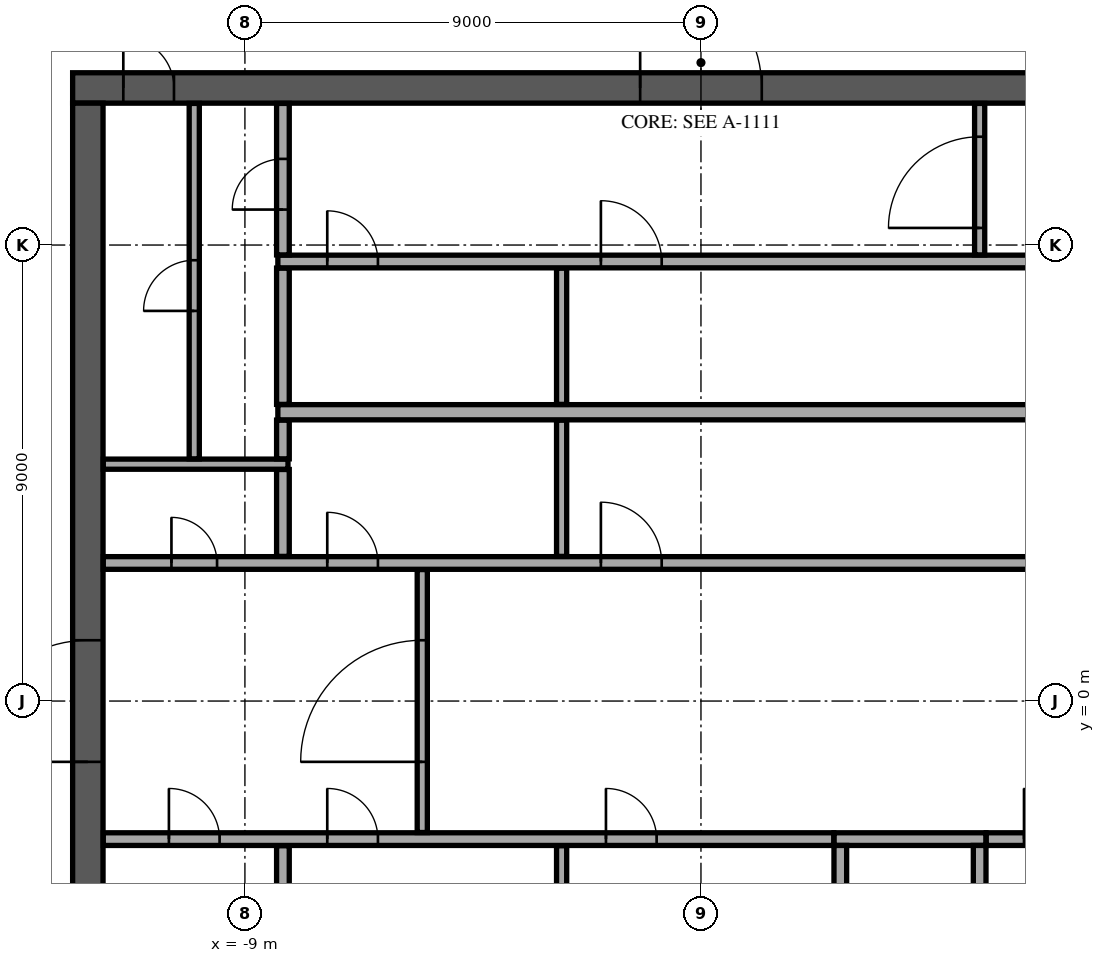
"""IFC4 building model, lengths in metres.
Left out: names, types, materials, properties, quantities, classifications, styles, units other than length and angle.
Written with IfcOpenShell. Run it as: python <this file> out.ifc"""

import sys

from ifc_helpers import new_model, si_unit, direction, frame, frame_2d, origin, place, context, subcontext, project, spatial, rectangle, extrude, element, fill, save


model = new_model("IFC4")
c1 = context("Model", 3, precision=1e-05, world=origin(), true_north=direction((0.0, 1.0)))
c2 = subcontext(c1, "Body", "Model", "MODEL_VIEW")
j1 = project(units=[si_unit("LENGTHUNIT", "METRE"), si_unit("PLANEANGLEUNIT", "RADIAN")], contexts=[c1])
p1 = place(None, origin())
s1 = spatial("IfcSite", under=j1, at=p1, CompositionType="ELEMENT")
p2 = place(p1, origin())
s2 = spatial("IfcBuilding", under=s1, at=p2, CompositionType="ELEMENT")
p3 = place(p2, frame((0.0, 0.0, 363.1)))
s3 = spatial("IfcBuildingStorey", under=s2, at=p3, CompositionType="ELEMENT", Elevation=363.1)
p4 = place(p3, frame((-12.4, 12.1, 0.0), z_axis=(0.0, 0.0, 1.0), x_axis=(1.0, 0.0, 0.0)))
e1 = element("IfcWall", 1, at=p4, inside=s3, PredefinedType="SHEAR", context=c2, shape_type="SweptSolid", body=[
    extrude(rectangle(XDim=24.8, YDim=0.6, at=frame_2d((12.4, 0.0))), origin(), (0.0, 0.0, 1.0), 4.7),
])
p5 = place(p4, frame((11.2, 0.0, 0.0)))
e2 = element("IfcOpeningElement", 2, at=p5, cuts=e1, PredefinedType="OPENING", context=c2, shape_type="SweptSolid", body=[
    extrude(rectangle(XDim=2.4, YDim=2.4, at=frame_2d((1.2, 1.2))), frame((0.0, 0.31, 0.0), z_axis=(0.0, -1.0, 0.0), x_axis=(1.0, 0.0, 0.0)), (0.0, 0.0, 1.0), 0.62),
])
p6 = place(p4, frame((22.025, 0.0, 0.0)))
e3 = element("IfcOpeningElement", 3, at=p6, cuts=e1, PredefinedType="OPENING", context=c2, shape_type="SweptSolid", body=[
    extrude(rectangle(XDim=1.2, YDim=2.1, at=frame_2d((0.6, 1.05))), frame((0.0, 0.31, 0.0), z_axis=(0.0, -1.0, 0.0), x_axis=(1.0, 0.0, 0.0)), (0.0, 0.0, 1.0), 0.62),
])
p7 = place(p4, frame((1.0, 0.0, 0.0)))
e4 = element("IfcOpeningElement", 4, at=p7, cuts=e1, PredefinedType="OPENING", context=c2, shape_type="SweptSolid", body=[
    extrude(rectangle(XDim=1.0, YDim=2.1, at=frame_2d((0.5, 1.05))), frame((0.0, 0.31, 0.0), z_axis=(0.0, -1.0, 0.0), x_axis=(1.0, 0.0, 0.0)), (0.0, 0.0, 1.0), 0.62),
])
p8 = place(p3, frame((-12.1, -11.8, 0.0), z_axis=(0.0, 0.0, 1.0), x_axis=(0.0, 1.0, 0.0)))
e5 = element("IfcWall", 5, at=p8, inside=s3, PredefinedType="SHEAR", context=c2, shape_type="SweptSolid", body=[
    extrude(rectangle(XDim=23.6, YDim=0.6, at=frame_2d((11.8, 0.0))), origin(), (0.0, 0.0, 1.0), 4.7),
])
p9 = place(p8, frame((10.6, 0.0, 0.0)))
e6 = element("IfcOpeningElement", 6, at=p9, cuts=e5, PredefinedType="OPENING", context=c2, shape_type="SweptSolid", body=[
    extrude(rectangle(XDim=2.4, YDim=2.4, at=frame_2d((1.2, 1.2))), frame((0.0, 0.31, 0.0), z_axis=(0.0, -1.0, 0.0), x_axis=(1.0, 0.0, 0.0)), (0.0, 0.0, 1.0), 0.62),
])
p10 = place(p3, frame((2.625, -2.725, 0.0), z_axis=(0.0, 0.0, 1.0), x_axis=(1.0, 0.0, 0.0)))
e7 = element("IfcWall", 7, at=p10, inside=s3, PredefinedType="SOLIDWALL", context=c2, shape_type="SweptSolid", body=[
    extrude(rectangle(XDim=3.0, YDim=0.25, at=frame_2d((1.5, 0.0))), origin(), (0.0, 0.0, 1.0), 4.7),
])
for number, where, z_axis, x_axis in (
    (8, (2.75, -5.55, 0.0), (0.0, 0.0, 1.0), (0.0, 1.0, 0.0)),
    (9, (5.5, -5.55, 0.0), (0.0, 0.0, 1.0), (0.0, 1.0, 0.0)),
):
    element("IfcWall", number, at=place(p3, frame(where, z_axis=z_axis, x_axis=x_axis)), inside=s3, PredefinedType="SOLIDWALL", context=c2, shape_type="SweptSolid", body=[
        extrude(rectangle(XDim=2.7, YDim=0.25, at=frame_2d((1.35, 0.0))), origin(), (0.0, 0.0, 1.0), 4.7),
    ])
p11 = place(p3, frame((-8.25, -5.545, 0.0), z_axis=(0.0, 0.0, 1.0), x_axis=(0.0, 1.0, 0.0)))
e10 = element("IfcWall", 10, at=p11, inside=s3, PredefinedType="PARTITIONING", context=c2, shape_type="SweptSolid", body=[
    extrude(rectangle(XDim=2.69, YDim=0.25, at=frame_2d((1.345, 0.0))), origin(), (0.0, 0.0, 1.0), 4.7),
])
p12 = place(p3, frame((-2.75, -5.545, 0.0), z_axis=(0.0, 0.0, 1.0), x_axis=(0.0, 1.0, 0.0)))
e11 = element("IfcWall", 11, at=p12, inside=s3, PredefinedType="PARTITIONING", context=c2, shape_type="SweptSolid", body=[
    extrude(rectangle(XDim=2.69, YDim=0.2, at=frame_2d((1.345, 0.0))), origin(), (0.0, 0.0, 1.0), 4.7),
])
p13 = place(p3, frame((-11.795, -2.725, 0.0), z_axis=(0.0, 0.0, 1.0), x_axis=(1.0, 0.0, 0.0)))
e12 = element("IfcWall", 12, at=p13, inside=s3, PredefinedType="PARTITIONING", context=c2, shape_type="SweptSolid", body=[
    extrude(rectangle(XDim=14.415, YDim=0.25, at=frame_2d((7.208, 0.0))), origin(), (0.0, 0.0, 1.0), 4.7),
])
p14 = place(p13, frame((1.295, 0.0, 0.0)))
e13 = element("IfcOpeningElement", 13, at=p14, cuts=e12, PredefinedType="OPENING", context=c2, shape_type="SweptSolid", body=[
    extrude(rectangle(XDim=1.0, YDim=2.1, at=frame_2d((0.5, 1.05))), frame((0.0, 0.135, 0.0), z_axis=(0.0, -1.0, 0.0), x_axis=(1.0, 0.0, 0.0)), (0.0, 0.0, 1.0), 0.27),
])
p15 = place(p13, frame((4.42, 0.0, 0.0)))
e14 = element("IfcOpeningElement", 14, at=p15, cuts=e12, PredefinedType="OPENING", context=c2, shape_type="SweptSolid", body=[
    extrude(rectangle(XDim=1.0, YDim=2.1, at=frame_2d((0.5, 1.05))), frame((0.0, 0.135, 0.0), z_axis=(0.0, -1.0, 0.0), x_axis=(1.0, 0.0, 0.0)), (0.0, 0.0, 1.0), 0.27),
])
p16 = place(p13, frame((9.92, 0.0, 0.0)))
e15 = element("IfcOpeningElement", 15, at=p16, cuts=e12, PredefinedType="OPENING", context=c2, shape_type="SweptSolid", body=[
    extrude(rectangle(XDim=1.0, YDim=2.1, at=frame_2d((0.5, 1.05))), frame((0.0, 0.135, 0.0), z_axis=(0.0, -1.0, 0.0), x_axis=(1.0, 0.0, 0.0)), (0.0, 0.0, 1.0), 0.27),
])
p17 = place(p3, frame((5.63, -2.725, 0.0), z_axis=(0.0, 0.0, 1.0), x_axis=(1.0, 0.0, 0.0)))
e16 = element("IfcWall", 16, at=p17, inside=s3, PredefinedType="PARTITIONING", context=c2, shape_type="SweptSolid", body=[
    extrude(rectangle(XDim=6.165, YDim=0.25, at=frame_2d((3.083, 0.0))), origin(), (0.0, 0.0, 1.0), 4.7),
])
p18 = place(p17, frame((0.745, 0.0, 0.0)))
e17 = element("IfcOpeningElement", 17, at=p18, cuts=e16, PredefinedType="OPENING", context=c2, shape_type="SweptSolid", body=[
    extrude(rectangle(XDim=1.0, YDim=2.1, at=frame_2d((0.5, 1.05))), frame((0.0, 0.135, 0.0), z_axis=(0.0, -1.0, 0.0), x_axis=(1.0, 0.0, 0.0)), (0.0, 0.0, 1.0), 0.27),
])
p19 = place(p17, frame((3.92, 0.0, 0.0)))
e18 = element("IfcOpeningElement", 18, at=p19, cuts=e16, PredefinedType="OPENING", context=c2, shape_type="SweptSolid", body=[
    extrude(rectangle(XDim=0.9, YDim=2.1, at=frame_2d((0.45, 1.05))), frame((0.0, 0.135, 0.0), z_axis=(0.0, -1.0, 0.0), x_axis=(1.0, 0.0, 0.0)), (0.0, 0.0, 1.0), 0.27),
])
p20 = place(p3, frame((-5.5, -2.595, 0.0), z_axis=(0.0, 0.0, 1.0), x_axis=(0.0, 1.0, 0.0)))
e19 = element("IfcWall", 19, at=p20, inside=s3, PredefinedType="PARTITIONING", context=c2, shape_type="SweptSolid", body=[
    extrude(rectangle(XDim=5.19, YDim=0.2, at=frame_2d((2.595, 0.0))), origin(), (0.0, 0.0, 1.0), 4.7),
])
p21 = place(p20, frame((1.395, 0.0, 0.0)))
e20 = element("IfcOpeningElement", 20, at=p21, cuts=e19, PredefinedType="OPENING", context=c2, shape_type="SweptSolid", body=[
    extrude(rectangle(XDim=2.4, YDim=2.4, at=frame_2d((1.2, 1.2))), frame((0.0, 0.11, 0.0), z_axis=(0.0, -1.0, 0.0), x_axis=(1.0, 0.0, 0.0)), (0.0, 0.0, 1.0), 0.22),
])
p22 = place(p3, frame((-11.795, 2.725, 0.0), z_axis=(0.0, 0.0, 1.0), x_axis=(1.0, 0.0, 0.0)))
e21 = element("IfcWall", 21, at=p22, inside=s3, PredefinedType="PARTITIONING", context=c2, shape_type="SweptSolid", body=[
    extrude(rectangle(XDim=23.59, YDim=0.25, at=frame_2d((11.795, 0.0))), origin(), (0.0, 0.0, 1.0), 4.7),
])
p23 = place(p22, frame((21.345, 0.0, 0.0)))
e22 = element("IfcOpeningElement", 22, at=p23, cuts=e21, PredefinedType="OPENING", context=c2, shape_type="SweptSolid", body=[
    extrude(rectangle(XDim=0.9, YDim=2.1, at=frame_2d((0.45, 1.05))), frame((0.0, 0.135, 0.0), z_axis=(0.0, -1.0, 0.0), x_axis=(1.0, 0.0, 0.0)), (0.0, 0.0, 1.0), 0.27),
])
p24 = place(p22, frame((1.345, 0.0, 0.0)))
e23 = element("IfcOpeningElement", 23, at=p24, cuts=e21, PredefinedType="OPENING", context=c2, shape_type="SweptSolid", body=[
    extrude(rectangle(XDim=0.9, YDim=2.1, at=frame_2d((0.45, 1.05))), frame((0.0, 0.135, 0.0), z_axis=(0.0, -1.0, 0.0), x_axis=(1.0, 0.0, 0.0)), (0.0, 0.0, 1.0), 0.27),
])
p25 = place(p22, frame((4.42, 0.0, 0.0)))
e24 = element("IfcOpeningElement", 24, at=p25, cuts=e21, PredefinedType="OPENING", context=c2, shape_type="SweptSolid", body=[
    extrude(rectangle(XDim=1.0, YDim=2.1, at=frame_2d((0.5, 1.05))), frame((0.0, 0.135, 0.0), z_axis=(0.0, -1.0, 0.0), x_axis=(1.0, 0.0, 0.0)), (0.0, 0.0, 1.0), 0.27),
])
p26 = place(p22, frame((9.82, 0.0, 0.0)))
e25 = element("IfcOpeningElement", 25, at=p26, cuts=e21, PredefinedType="OPENING", context=c2, shape_type="SweptSolid", body=[
    extrude(rectangle(XDim=1.2, YDim=2.1, at=frame_2d((0.6, 1.05))), frame((0.0, 0.135, 0.0), z_axis=(0.0, -1.0, 0.0), x_axis=(1.0, 0.0, 0.0)), (0.0, 0.0, 1.0), 0.27),
])
p27 = place(p3, frame((-8.25, 2.855, 0.0), z_axis=(0.0, 0.0, 1.0), x_axis=(0.0, 1.0, 0.0)))
e26 = element("IfcWall", 26, at=p27, inside=s3, PredefinedType="PARTITIONING", context=c2, shape_type="SweptSolid", body=[
    extrude(rectangle(XDim=1.715, YDim=0.25, at=frame_2d((0.857, 0.0))), origin(), (0.0, 0.0, 1.0), 4.7),
])
p28 = place(p3, frame((-2.75, 2.855, 0.0), z_axis=(0.0, 0.0, 1.0), x_axis=(0.0, 1.0, 0.0)))
e27 = element("IfcWall", 27, at=p28, inside=s3, PredefinedType="PARTITIONING", context=c2, shape_type="SweptSolid", body=[
    extrude(rectangle(XDim=2.69, YDim=0.2, at=frame_2d((1.345, 0.0))), origin(), (0.0, 0.0, 1.0), 4.7),
])
p29 = place(p3, frame((-11.795, 4.675, 0.0), z_axis=(0.0, 0.0, 1.0), x_axis=(1.0, 0.0, 0.0)))
e28 = element("IfcWall", 28, at=p29, inside=s3, PredefinedType="PARTITIONING", context=c2, shape_type="SweptSolid", body=[
    extrude(rectangle(XDim=3.645, YDim=0.2, at=frame_2d((1.823, 0.0))), origin(), (0.0, 0.0, 1.0), 4.7),
])
p30 = place(p3, frame((-10.0, 4.78, 0.0), z_axis=(0.0, 0.0, 1.0), x_axis=(0.0, 1.0, 0.0)))
e29 = element("IfcWall", 29, at=p30, inside=s3, PredefinedType="PARTITIONING", context=c2, shape_type="SweptSolid", body=[
    extrude(rectangle(XDim=7.015, YDim=0.2, at=frame_2d((3.507, 0.0))), origin(), (0.0, 0.0, 1.0), 4.7),
])
p31 = place(p30, frame((2.92, 0.0, 0.0)))
e30 = element("IfcOpeningElement", 30, at=p31, cuts=e29, PredefinedType="OPENING", context=c2, shape_type="SweptSolid", body=[
    extrude(rectangle(XDim=1.0, YDim=2.1, at=frame_2d((0.5, 1.05))), frame((0.0, 0.11, 0.0), z_axis=(0.0, -1.0, 0.0), x_axis=(1.0, 0.0, 0.0)), (0.0, 0.0, 1.0), 0.22),
])
p32 = place(p3, frame((-8.25, 4.78, 0.0), z_axis=(0.0, 0.0, 1.0), x_axis=(0.0, 1.0, 0.0)))
e31 = element("IfcWall", 31, at=p32, inside=s3, PredefinedType="PARTITIONING", context=c2, shape_type="SweptSolid", body=[
    extrude(rectangle(XDim=0.765, YDim=0.25, at=frame_2d((0.382, 0.0))), origin(), (0.0, 0.0, 1.0), 4.7),
])
p33 = place(p3, frame((-8.35, 5.7, 0.0), z_axis=(0.0, 0.0, 1.0), x_axis=(1.0, 0.0, 0.0)))
e32 = element("IfcWall", 32, at=p33, inside=s3, PredefinedType="PARTITIONING", context=c2, shape_type="SweptSolid", body=[
    extrude(rectangle(XDim=16.7, YDim=0.3, at=frame_2d((8.35, 0.0))), origin(), (0.0, 0.0, 1.0), 4.7),
])
p34 = place(p3, frame((-8.25, 5.855, 0.0), z_axis=(0.0, 0.0, 1.0), x_axis=(0.0, 1.0, 0.0)))
e33 = element("IfcWall", 33, at=p34, inside=s3, PredefinedType="PARTITIONING", context=c2, shape_type="SweptSolid", body=[
    extrude(rectangle(XDim=2.69, YDim=0.25, at=frame_2d((1.345, 0.0))), origin(), (0.0, 0.0, 1.0), 4.7),
])
p35 = place(p3, frame((-2.75, 5.855, 0.0), z_axis=(0.0, 0.0, 1.0), x_axis=(0.0, 1.0, 0.0)))
e34 = element("IfcWall", 34, at=p35, inside=s3, PredefinedType="PARTITIONING", context=c2, shape_type="SweptSolid", body=[
    extrude(rectangle(XDim=2.69, YDim=0.2, at=frame_2d((1.345, 0.0))), origin(), (0.0, 0.0, 1.0), 4.7),
])
p36 = place(p3, frame((-8.35, 8.675, 0.0), z_axis=(0.0, 0.0, 1.0), x_axis=(1.0, 0.0, 0.0)))
e35 = element("IfcWall", 35, at=p36, inside=s3, PredefinedType="PARTITIONING", context=c2, shape_type="SweptSolid", body=[
    extrude(rectangle(XDim=16.72, YDim=0.25, at=frame_2d((8.36, 0.0))), origin(), (0.0, 0.0, 1.0), 4.7),
])
p37 = place(p36, frame((0.975, 0.0, 0.0)))
e36 = element("IfcOpeningElement", 36, at=p37, cuts=e35, PredefinedType="OPENING", context=c2, shape_type="SweptSolid", body=[
    extrude(rectangle(XDim=1.0, YDim=2.1, at=frame_2d((0.5, 1.05))), frame((0.0, 0.135, 0.0), z_axis=(0.0, -1.0, 0.0), x_axis=(1.0, 0.0, 0.0)), (0.0, 0.0, 1.0), 0.27),
])
p38 = place(p36, frame((6.375, 0.0, 0.0)))
e37 = element("IfcOpeningElement", 37, at=p38, cuts=e35, PredefinedType="OPENING", context=c2, shape_type="SweptSolid", body=[
    extrude(rectangle(XDim=1.2, YDim=2.1, at=frame_2d((0.6, 1.05))), frame((0.0, 0.135, 0.0), z_axis=(0.0, -1.0, 0.0), x_axis=(1.0, 0.0, 0.0)), (0.0, 0.0, 1.0), 0.27),
])
p39 = place(p3, frame((-8.25, 8.805, 0.0), z_axis=(0.0, 0.0, 1.0), x_axis=(0.0, 1.0, 0.0)))
e38 = element("IfcWall", 38, at=p39, inside=s3, PredefinedType="PARTITIONING", context=c2, shape_type="SweptSolid", body=[
    extrude(rectangle(XDim=2.99, YDim=0.25, at=frame_2d((1.495, 0.0))), origin(), (0.0, 0.0, 1.0), 4.7),
])
p40 = place(p39, frame((0.895, 0.0, 0.0)))
e39 = element("IfcOpeningElement", 39, at=p40, cuts=e38, PredefinedType="OPENING", context=c2, shape_type="SweptSolid", body=[
    extrude(rectangle(XDim=1.0, YDim=2.1, at=frame_2d((0.5, 1.05))), frame((0.0, 0.135, 0.0), z_axis=(0.0, -1.0, 0.0), x_axis=(1.0, 0.0, 0.0)), (0.0, 0.0, 1.0), 0.27),
])
p41 = place(p3, frame((5.5, 8.805, 0.0), z_axis=(0.0, 0.0, 1.0), x_axis=(0.0, 1.0, 0.0)))
e40 = element("IfcWall", 40, at=p41, inside=s3, PredefinedType="PARTITIONING", context=c2, shape_type="SweptSolid", body=[
    extrude(rectangle(XDim=2.99, YDim=0.2, at=frame_2d((1.495, 0.0))), origin(), (0.0, 0.0, 1.0), 4.7),
])
p42 = place(p41, frame((0.532, 0.0, 0.0)))
e41 = element("IfcOpeningElement", 41, at=p42, cuts=e40, PredefinedType="OPENING", context=c2, shape_type="SweptSolid", body=[
    extrude(rectangle(XDim=1.8, YDim=2.1, at=frame_2d((0.9, 1.05))), frame((0.0, 0.11, 0.0), z_axis=(0.0, -1.0, 0.0), x_axis=(1.0, 0.0, 0.0)), (0.0, 0.0, 1.0), 0.22),
])
p43 = place(p5, origin())
e42 = element("IfcDoor", 42, at=p43, inside=s3, OperationType="SINGLE_SWING_LEFT", PredefinedType="DOOR", context=c2, shape_type="SweptSolid", body=[
    extrude(rectangle(XDim=2.4, YDim=2.4, at=frame_2d((1.2, 1.2))), frame((0.0, 0.025, 0.0), z_axis=(0.0, -1.0, 0.0), x_axis=(1.0, 0.0, 0.0)), (0.0, 0.0, 1.0), 0.05),
])
fill(e2, e42)
p44 = place(p7, origin())
e43 = element("IfcDoor", 43, at=p44, inside=s3, OperationType="SINGLE_SWING_LEFT", PredefinedType="DOOR", context=c2, shape_type="SweptSolid", body=[
    extrude(rectangle(XDim=1.0, YDim=2.1, at=frame_2d((0.5, 1.05))), frame((0.0, 0.025, 0.0), z_axis=(0.0, -1.0, 0.0), x_axis=(1.0, 0.0, 0.0)), (0.0, 0.0, 1.0), 0.05),
])
fill(e4, e43)
p45 = place(p9, origin())
e44 = element("IfcDoor", 44, at=p45, inside=s3, OperationType="SINGLE_SWING_LEFT", PredefinedType="DOOR", context=c2, shape_type="SweptSolid", body=[
    extrude(rectangle(XDim=2.4, YDim=2.4, at=frame_2d((1.2, 1.2))), frame((0.0, 0.025, 0.0), z_axis=(0.0, -1.0, 0.0), x_axis=(1.0, 0.0, 0.0)), (0.0, 0.0, 1.0), 0.05),
])
fill(e6, e44)
p46 = place(p14, origin())
e45 = element("IfcDoor", 45, at=p46, inside=s3, OperationType="SINGLE_SWING_RIGHT", PredefinedType="DOOR", context=c2, shape_type="SweptSolid", body=[
    extrude(rectangle(XDim=1.0, YDim=2.1, at=frame_2d((0.5, 1.05))), frame((0.0, 0.025, 0.0), z_axis=(0.0, -1.0, 0.0), x_axis=(1.0, 0.0, 0.0)), (0.0, 0.0, 1.0), 0.05),
])
fill(e13, e45)
p47 = place(p18, origin())
e46 = element("IfcDoor", 46, at=p47, inside=s3, OperationType="SINGLE_SWING_RIGHT", PredefinedType="DOOR", context=c2, shape_type="SweptSolid", body=[
    extrude(rectangle(XDim=1.0, YDim=2.1, at=frame_2d((0.5, 1.05))), frame((0.0, 0.025, 0.0), z_axis=(0.0, -1.0, 0.0), x_axis=(1.0, 0.0, 0.0)), (0.0, 0.0, 1.0), 0.05),
])
fill(e17, e46)
p48 = place(p24, origin())
e47 = element("IfcDoor", 47, at=p48, inside=s3, OperationType="SINGLE_SWING_RIGHT", PredefinedType="DOOR", context=c2, shape_type="SweptSolid", body=[
    extrude(rectangle(XDim=0.9, YDim=2.1, at=frame_2d((0.45, 1.05))), frame((0.0, 0.025, 0.0), z_axis=(0.0, -1.0, 0.0), x_axis=(1.0, 0.0, 0.0)), (0.0, 0.0, 1.0), 0.05),
])
fill(e23, e47)
p49 = place(p31, origin())
e48 = element("IfcDoor", 48, at=p49, inside=s3, OperationType="SINGLE_SWING_RIGHT", PredefinedType="DOOR", context=c2, shape_type="SweptSolid", body=[
    extrude(rectangle(XDim=1.0, YDim=2.1, at=frame_2d((0.5, 1.05))), frame((0.0, 0.025, 0.0), z_axis=(0.0, -1.0, 0.0), x_axis=(1.0, 0.0, 0.0)), (0.0, 0.0, 1.0), 0.05),
])
fill(e30, e48)
p50 = place(p40, origin())
e49 = element("IfcDoor", 49, at=p50, inside=s3, OperationType="SINGLE_SWING_RIGHT", PredefinedType="DOOR", context=c2, shape_type="SweptSolid", body=[
    extrude(rectangle(XDim=1.0, YDim=2.1, at=frame_2d((0.5, 1.05))), frame((0.0, 0.025, 0.0), z_axis=(0.0, -1.0, 0.0), x_axis=(1.0, 0.0, 0.0)), (0.0, 0.0, 1.0), 0.05),
])
fill(e39, e49)
p51 = place(p25, origin())
e50 = element("IfcDoor", 50, at=p51, inside=s3, OperationType="SINGLE_SWING_RIGHT", PredefinedType="DOOR", context=c2, shape_type="SweptSolid", body=[
    extrude(rectangle(XDim=1.0, YDim=2.1, at=frame_2d((0.5, 1.05))), frame((0.0, 0.025, 0.0), z_axis=(0.0, -1.0, 0.0), x_axis=(1.0, 0.0, 0.0)), (0.0, 0.0, 1.0), 0.05),
])
fill(e24, e50)
p52 = place(p26, origin())
e51 = element("IfcDoor", 51, at=p52, inside=s3, OperationType="SINGLE_SWING_LEFT", PredefinedType="DOOR", context=c2, shape_type="SweptSolid", body=[
    extrude(rectangle(XDim=1.2, YDim=2.1, at=frame_2d((0.6, 1.05))), frame((0.0, 0.025, 0.0), z_axis=(0.0, -1.0, 0.0), x_axis=(1.0, 0.0, 0.0)), (0.0, 0.0, 1.0), 0.05),
])
fill(e25, e51)
p53 = place(p37, origin())
e52 = element("IfcDoor", 52, at=p53, inside=s3, OperationType="SINGLE_SWING_RIGHT", PredefinedType="DOOR", context=c2, shape_type="SweptSolid", body=[
    extrude(rectangle(XDim=1.0, YDim=2.1, at=frame_2d((0.5, 1.05))), frame((0.0, 0.025, 0.0), z_axis=(0.0, -1.0, 0.0), x_axis=(1.0, 0.0, 0.0)), (0.0, 0.0, 1.0), 0.05),
])
fill(e36, e52)
p54 = place(p38, origin())
e53 = element("IfcDoor", 53, at=p54, inside=s3, OperationType="SINGLE_SWING_LEFT", PredefinedType="DOOR", context=c2, shape_type="SweptSolid", body=[
    extrude(rectangle(XDim=1.2, YDim=2.1, at=frame_2d((0.6, 1.05))), frame((0.0, 0.025, 0.0), z_axis=(0.0, -1.0, 0.0), x_axis=(1.0, 0.0, 0.0)), (0.0, 0.0, 1.0), 0.05),
])
fill(e37, e53)
p55 = place(p15, origin())
e54 = element("IfcDoor", 54, at=p55, inside=s3, OperationType="SINGLE_SWING_RIGHT", PredefinedType="DOOR", context=c2, shape_type="SweptSolid", body=[
    extrude(rectangle(XDim=1.0, YDim=2.1, at=frame_2d((0.5, 1.05))), frame((0.0, 0.025, 0.0), z_axis=(0.0, -1.0, 0.0), x_axis=(1.0, 0.0, 0.0)), (0.0, 0.0, 1.0), 0.05),
])
fill(e14, e54)
p56 = place(p16, origin())
e55 = element("IfcDoor", 55, at=p56, inside=s3, OperationType="SINGLE_SWING_RIGHT", PredefinedType="DOOR", context=c2, shape_type="SweptSolid", body=[
    extrude(rectangle(XDim=1.0, YDim=2.1, at=frame_2d((0.5, 1.05))), frame((0.0, 0.025, 0.0), z_axis=(0.0, -1.0, 0.0), x_axis=(1.0, 0.0, 0.0)), (0.0, 0.0, 1.0), 0.05),
])
fill(e15, e55)
p57 = place(p21, origin())
e56 = element("IfcDoor", 56, at=p57, inside=s3, OperationType="DOUBLE_DOOR_DOUBLE_SWING", PredefinedType="DOOR", context=c2, shape_type="SweptSolid", body=[
    extrude(rectangle(XDim=2.4, YDim=2.4, at=frame_2d((1.2, 1.2))), frame((0.0, 0.025, 0.0), z_axis=(0.0, -1.0, 0.0), x_axis=(1.0, 0.0, 0.0)), (0.0, 0.0, 1.0), 0.05),
])
fill(e20, e56)
p58 = place(p42, origin())
e57 = element("IfcDoor", 57, at=p58, inside=s3, OperationType="SINGLE_SWING_LEFT", PredefinedType="DOOR", context=c2, shape_type="SweptSolid", body=[
    extrude(rectangle(XDim=1.8, YDim=2.1, at=frame_2d((0.9, 1.05))), frame((0.0, 0.025, 0.0), z_axis=(0.0, -1.0, 0.0), x_axis=(1.0, 0.0, 0.0)), (0.0, 0.0, 1.0), 0.05),
])
fill(e41, e57)
save(model, sys.argv[1])
